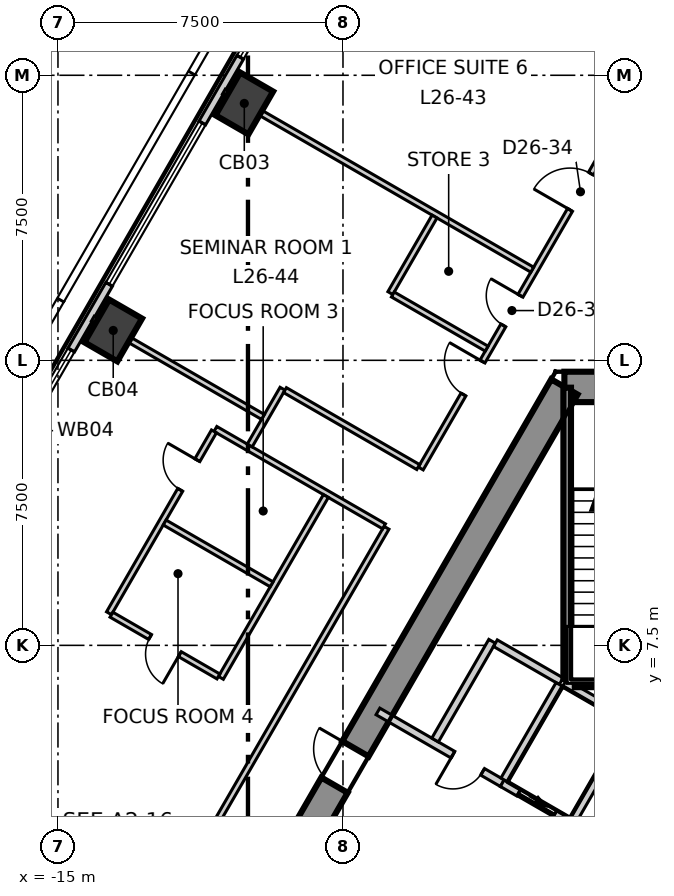
"""IFC4 building model, lengths in metres.
Left out: names, types, materials, properties, quantities, classifications, styles, units other than length and angle.
Written with IfcOpenShell. Run it as: python <this file> out.ifc"""

import sys

from ifc_helpers import new_model, si_unit, direction, frame, frame_2d, origin, origin_2d, place, context, subcontext, project, spatial, polyline, rectangle, outline, extrude, element, fill, save


model = new_model("IFC4")
c1 = context("Model", 3, precision=1e-05, world=origin(), true_north=direction((0.0, 1.0)))
c2 = subcontext(c1, "Body", "Model", "MODEL_VIEW")
j1 = project(units=[si_unit("LENGTHUNIT", "METRE"), si_unit("PLANEANGLEUNIT", "RADIAN")], contexts=[c1])
p1 = place(None, origin())
s1 = spatial("IfcSite", under=j1, at=p1, CompositionType="ELEMENT")
p2 = place(p1, origin())
s2 = spatial("IfcBuilding", under=s1, at=p2, CompositionType="ELEMENT")
p3 = place(p2, frame((0.0, 0.0, 116.3)))
s3 = spatial("IfcBuildingStorey", under=s2, at=p3, CompositionType="ELEMENT", Elevation=116.3)
p4 = place(p3, frame((1.674, 14.3, -0.3), z_axis=(0.0, 0.0, 1.0), x_axis=(-1.0, 0.0, 0.0)))
e1 = element("IfcWall", 1, at=p4, inside=s3, PredefinedType="SHEAR", context=c2, shape_type="SweptSolid", body=[
    extrude(outline(polyline([(-0.231, -0.4), (1.674, -0.4), (3.579, -0.4), (3.117, 0.4), (1.674, 0.4), (0.231, 0.4), (-0.231, -0.4)])), origin(), (0.0, 0.0, 1.0), 4.0),
])
p5 = place(p4, frame((0.974, 0.0, 0.3)))
e2 = element("IfcOpeningElement", 2, at=p5, cuts=e1, PredefinedType="OPENING", context=c2, shape_type="SweptSolid", body=[
    extrude(rectangle(XDim=1.4, YDim=2.1, at=frame_2d((0.7, 1.05))), frame((0.0, 0.41, 0.0), z_axis=(0.0, -1.0, 0.0), x_axis=(1.0, 0.0, 0.0)), (0.0, 0.0, 1.0), 0.82),
])
p6 = place(p3, frame((-1.674, 14.3, -0.3), z_axis=(0.0, 0.0, 1.0), x_axis=(-0.499995765644, -0.866027848477, 0.0)))
e3 = element("IfcWall", 3, at=p6, inside=s3, PredefinedType="SHEAR", context=c2, shape_type="SweptSolid", body=[
    extrude(outline(polyline([(-0.231, -0.4), (1.732, -0.4), (3.695, -0.4), (5.658, -0.4), (7.621, -0.4), (9.584, -0.4), (11.547, -0.4), (13.51, -0.4), (15.473, -0.4), (17.436, -0.4), (19.399, -0.4), (21.362, -0.4), (23.325, -0.4), (22.863, 0.4), (20.977, 0.4), (19.091, 0.4), (17.205, 0.4), (15.319, 0.4), (13.433, 0.4), (11.547, 0.4), (9.661, 0.4), (7.775, 0.4), (5.889, 0.4), (4.003, 0.4), (2.117, 0.4), (0.231, 0.4), (-0.231, -0.4)])), origin(), (0.0, 0.0, 1.0), 4.0),
])
p7 = place(p6, frame((10.997, 0.0, 0.3)))
e4 = element("IfcOpeningElement", 4, at=p7, cuts=e3, PredefinedType="OPENING", context=c2, shape_type="SweptSolid", body=[
    extrude(rectangle(XDim=1.1, YDim=2.1, at=frame_2d((0.55, 1.05))), frame((0.0, 0.41, 0.0), z_axis=(0.0, -1.0, 0.0), x_axis=(1.0, 0.0, 0.0)), (0.0, 0.0, 1.0), 0.82),
])
for number, where, z_axis, x_axis in (
    (5, (-10.097, 21.76, -0.3), (0.0, 0.0, 1.0), (0.5, 0.866, 0.0)),
    (6, (-13.546, 15.786, -0.3), (0.0, 0.0, 1.0), (0.5, 0.866, 0.0)),
):
    element("IfcColumn", number, at=place(p3, frame(where, z_axis=z_axis, x_axis=x_axis)), inside=s3, PredefinedType="COLUMN", context=c2, shape_type="SweptSolid", body=[
        extrude(rectangle(XDim=1.3, YDim=1.0, at=origin_2d()), origin(), (0.0, 0.0, 1.0), 4.0),
    ])
p8 = place(p3, frame((-3.154, 35.185, 0.0), z_axis=(0.0, 0.0, 1.0), x_axis=(-0.499996704161, -0.866027306629, 0.0)))
e7 = element("IfcWall", 7, at=p8, inside=s3, PredefinedType="ELEMENTEDWALL", context=c2, shape_type="SweptSolid", body=[
    extrude(rectangle(XDim=57.769, YDim=0.2, at=frame_2d((28.884, 0.0))), origin(), (0.0, 0.0, 1.0), 3.7),
])
p9 = place(p8, frame((2.301, 0.0, 0.9)))
e8 = element("IfcOpeningElement", 8, at=p9, cuts=e7, PredefinedType="OPENING", context=c2, shape_type="SweptSolid", body=[
    extrude(rectangle(XDim=4.9, YDim=2.5, at=frame_2d((2.45, 1.25))), frame((0.0, 0.11, 0.0), z_axis=(0.0, -1.0, 0.0), x_axis=(1.0, 0.0, 0.0)), (0.0, 0.0, 1.0), 0.22),
])
p10 = place(p8, frame((9.199, 0.0, 0.9)))
e9 = element("IfcOpeningElement", 9, at=p10, cuts=e7, PredefinedType="OPENING", context=c2, shape_type="SweptSolid", body=[
    extrude(rectangle(XDim=4.9, YDim=2.5, at=frame_2d((2.45, 1.25))), frame((0.0, 0.11, 0.0), z_axis=(0.0, -1.0, 0.0), x_axis=(1.0, 0.0, 0.0)), (0.0, 0.0, 1.0), 0.22),
])
p11 = place(p8, frame((16.097, 0.0, 0.9)))
e10 = element("IfcOpeningElement", 10, at=p11, cuts=e7, PredefinedType="OPENING", context=c2, shape_type="SweptSolid", body=[
    extrude(rectangle(XDim=4.9, YDim=2.5, at=frame_2d((2.45, 1.25))), frame((0.0, 0.11, 0.0), z_axis=(0.0, -1.0, 0.0), x_axis=(1.0, 0.0, 0.0)), (0.0, 0.0, 1.0), 0.22),
])
p12 = place(p8, frame((22.995, 0.0, 0.9)))
e11 = element("IfcOpeningElement", 11, at=p12, cuts=e7, PredefinedType="OPENING", context=c2, shape_type="SweptSolid", body=[
    extrude(rectangle(XDim=4.9, YDim=2.5, at=frame_2d((2.45, 1.25))), frame((0.0, 0.11, 0.0), z_axis=(0.0, -1.0, 0.0), x_axis=(1.0, 0.0, 0.0)), (0.0, 0.0, 1.0), 0.22),
])
p13 = place(p8, frame((29.893, 0.0, 0.9)))
e12 = element("IfcOpeningElement", 12, at=p13, cuts=e7, PredefinedType="OPENING", context=c2, shape_type="SweptSolid", body=[
    extrude(rectangle(XDim=4.9, YDim=2.5, at=frame_2d((2.45, 1.25))), frame((0.0, 0.11, 0.0), z_axis=(0.0, -1.0, 0.0), x_axis=(1.0, 0.0, 0.0)), (0.0, 0.0, 1.0), 0.22),
])
p14 = place(p8, frame((36.791, 0.0, 0.9)))
e13 = element("IfcOpeningElement", 13, at=p14, cuts=e7, PredefinedType="OPENING", context=c2, shape_type="SweptSolid", body=[
    extrude(rectangle(XDim=4.9, YDim=2.5, at=frame_2d((2.45, 1.25))), frame((0.0, 0.11, 0.0), z_axis=(0.0, -1.0, 0.0), x_axis=(1.0, 0.0, 0.0)), (0.0, 0.0, 1.0), 0.22),
])
p15 = place(p8, frame((43.689, 0.0, 0.9)))
e14 = element("IfcOpeningElement", 14, at=p15, cuts=e7, PredefinedType="OPENING", context=c2, shape_type="SweptSolid", body=[
    extrude(rectangle(XDim=4.9, YDim=2.5, at=frame_2d((2.45, 1.25))), frame((0.0, 0.11, 0.0), z_axis=(0.0, -1.0, 0.0), x_axis=(1.0, 0.0, 0.0)), (0.0, 0.0, 1.0), 0.22),
])
p16 = place(p8, frame((50.586, 0.0, 0.9)))
e15 = element("IfcOpeningElement", 15, at=p16, cuts=e7, PredefinedType="OPENING", context=c2, shape_type="SweptSolid", body=[
    extrude(rectangle(XDim=4.9, YDim=2.5, at=frame_2d((2.45, 1.25))), frame((0.0, 0.11, 0.0), z_axis=(0.0, -1.0, 0.0), x_axis=(1.0, 0.0, 0.0)), (0.0, 0.0, 1.0), 0.22),
])
p17 = place(p3, frame((-18.631, -10.67, 0.0), z_axis=(0.0, 0.0, 1.0), x_axis=(0.499981532133, 0.86603606595, 0.0)))
e16 = element("IfcWall", 16, at=p17, inside=s3, PredefinedType="PARTITIONING", context=c2, shape_type="SweptSolid", body=[
    extrude(rectangle(XDim=24.553, YDim=0.15, at=frame_2d((12.277, 0.0))), origin(), (0.0, 0.0, 1.0), 3.7),
])
p18 = place(p17, frame((11.604, 0.0, 0.0)))
e17 = element("IfcOpeningElement", 17, at=p18, cuts=e16, PredefinedType="OPENING", context=c2, shape_type="SweptSolid", body=[
    extrude(rectangle(XDim=1.1, YDim=2.1, at=frame_2d((0.55, 1.05))), frame((0.0, 0.085, 0.0), z_axis=(0.0, -1.0, 0.0), x_axis=(1.0, 0.0, 0.0)), (0.0, 0.0, 1.0), 0.17),
])
p19 = place(p3, frame((-5.454, 12.154, 0.0), z_axis=(0.0, 0.0, 1.0), x_axis=(0.500029221456, 0.866008532111, 0.0)))
e18 = element("IfcWall", 18, at=p19, inside=s3, PredefinedType="PARTITIONING", context=c2, shape_type="SweptSolid", body=[
    extrude(rectangle(XDim=10.907, YDim=0.15, at=frame_2d((5.454, 0.0))), origin(), (0.0, 0.0, 1.0), 3.7),
])
p20 = place(p19, frame((7.857, 0.0, 0.0)))
e19 = element("IfcOpeningElement", 19, at=p20, cuts=e18, PredefinedType="OPENING", context=c2, shape_type="SweptSolid", body=[
    extrude(rectangle(XDim=1.1, YDim=2.1, at=frame_2d((0.55, 1.05))), frame((0.0, 0.085, 0.0), z_axis=(0.0, -1.0, 0.0), x_axis=(1.0, 0.0, 0.0)), (0.0, 0.0, 1.0), 0.17),
])
p21 = place(p19, frame((2.248, 0.0, 0.0)))
e20 = element("IfcOpeningElement", 20, at=p21, cuts=e18, PredefinedType="OPENING", context=c2, shape_type="SweptSolid", body=[
    extrude(rectangle(XDim=1.0, YDim=2.1, at=frame_2d((0.5, 1.05))), frame((0.0, 0.085, 0.0), z_axis=(0.0, -1.0, 0.0), x_axis=(1.0, 0.0, 0.0)), (0.0, 0.0, 1.0), 0.17),
])
p22 = place(p19, frame((4.348, 0.0, 0.0)))
e21 = element("IfcOpeningElement", 21, at=p22, cuts=e18, PredefinedType="OPENING", context=c2, shape_type="SweptSolid", body=[
    extrude(rectangle(XDim=0.9, YDim=2.1, at=frame_2d((0.45, 1.05))), frame((0.0, 0.085, 0.0), z_axis=(0.0, -1.0, 0.0), x_axis=(1.0, 0.0, 0.0)), (0.0, 0.0, 1.0), 0.17),
])
p23 = place(p3, frame((-10.857, 13.194, 0.0), z_axis=(0.0, 0.0, 1.0), x_axis=(0.865999895656, -0.500044178772, 0.0)))
e22 = element("IfcWall", 22, at=p23, inside=s3, PredefinedType="PARTITIONING", context=c2, shape_type="SweptSolid", body=[
    extrude(rectangle(XDim=5.124, YDim=0.15, at=frame_2d((2.562, 0.0))), origin(), (0.0, 0.0, 1.0), 3.7),
])
p24 = place(p3, frame((-9.954, 12.759, 0.0), z_axis=(0.0, 0.0, 1.0), x_axis=(0.500232802748, 0.865890953328, 0.0)))
e23 = element("IfcWall", 23, at=p24, inside=s3, PredefinedType="PARTITIONING", context=c2, shape_type="SweptSolid", body=[
    extrude(rectangle(XDim=1.725, YDim=0.15, at=frame_2d((0.863, 0.0))), origin(), (0.0, 0.0, 1.0), 3.7),
])
p25 = place(p3, frame((-14.083, 16.096, 0.0), z_axis=(0.0, 0.0, 1.0), x_axis=(0.866014140959, -0.500019507279, 0.0)))
e24 = element("IfcWall", 24, at=p25, inside=s3, PredefinedType="PARTITIONING", context=c2, shape_type="SweptSolid", body=[
    extrude(rectangle(XDim=5.17, YDim=0.15, at=frame_2d((2.585, 0.0))), origin(), (0.0, 0.0, 1.0), 3.7),
])
p26 = place(p3, frame((-10.634, 22.07, 0.0), z_axis=(0.0, 0.0, 1.0), x_axis=(0.866005502057, -0.500034469219, 0.0)))
e25 = element("IfcWall", 25, at=p26, inside=s3, PredefinedType="PARTITIONING", context=c2, shape_type="SweptSolid", body=[
    extrude(rectangle(XDim=9.369, YDim=0.15, at=frame_2d((4.685, 0.0))), origin(), (0.0, 0.0, 1.0), 3.7),
])
p27 = place(p3, frame((-9.026, 14.216, 0.0), z_axis=(0.0, 0.0, 1.0), x_axis=(0.865914407792, -0.500192201437, 0.0)))
e26 = element("IfcWall", 26, at=p27, inside=s3, PredefinedType="PARTITIONING", context=c2, shape_type="SweptSolid", body=[
    extrude(rectangle(XDim=4.049, YDim=0.15, at=frame_2d((2.024, 0.0))), origin(), (0.0, 0.0, 1.0), 3.7),
])
p28 = place(p3, frame((-6.253, 16.769, 0.0), z_axis=(0.0, 0.0, 1.0), x_axis=(0.499719423372, 0.866187334186, 0.0)))
e27 = element("IfcWall", 27, at=p28, inside=s3, PredefinedType="PARTITIONING", context=c2, shape_type="SweptSolid", body=[
    extrude(rectangle(XDim=2.325, YDim=0.15, at=frame_2d((1.163, 0.0))), origin(), (0.0, 0.0, 1.0), 3.7),
])
p29 = place(p3, frame((-6.188, 16.732, 0.0), z_axis=(0.0, 0.0, 1.0), x_axis=(0.866004402611, -0.500036373335, 0.0)))
e28 = element("IfcWall", 28, at=p29, inside=s3, PredefinedType="PARTITIONING", context=c2, shape_type="SweptSolid", body=[
    extrude(rectangle(XDim=2.85, YDim=0.15, at=frame_2d((1.425, 0.0))), origin(), (0.0, 0.0, 1.0), 3.7),
])
p30 = place(p3, frame((-10.713, 6.645, 0.0), z_axis=(0.0, 0.0, 1.0), x_axis=(0.500050108258, 0.865996471835, 0.0)))
e29 = element("IfcWall", 29, at=p30, inside=s3, PredefinedType="PARTITIONING", context=c2, shape_type="SweptSolid", body=[
    extrude(rectangle(XDim=5.525, YDim=0.15, at=frame_2d((2.763, 0.0))), origin(), (0.0, 0.0, 1.0), 3.7),
])
p31 = place(p3, frame((-13.657, 8.345, 0.0), z_axis=(0.0, 0.0, 1.0), x_axis=(0.499917542299, 0.866073005526, 0.0)))
e30 = element("IfcWall", 30, at=p31, inside=s3, PredefinedType="PARTITIONING", context=c2, shape_type="SweptSolid", body=[
    extrude(rectangle(XDim=5.525, YDim=0.15, at=frame_2d((2.762, 0.0))), origin(), (0.0, 0.0, 1.0), 3.7),
])
p32 = place(p31, frame((3.75, 0.0, 0.0)))
e31 = element("IfcOpeningElement", 31, at=p32, cuts=e30, PredefinedType="OPENING", context=c2, shape_type="SweptSolid", body=[
    extrude(rectangle(XDim=0.9, YDim=2.1, at=frame_2d((0.45, 1.05))), frame((0.0, 0.085, 0.0), z_axis=(0.0, -1.0, 0.0), x_axis=(1.0, 0.0, 0.0)), (0.0, 0.0, 1.0), 0.17),
])
p33 = place(p3, frame((-13.592, 8.307, 0.0), z_axis=(0.0, 0.0, 1.0), x_axis=(0.865977875238, -0.500082312822, 0.0)))
e32 = element("IfcWall", 32, at=p33, inside=s3, PredefinedType="PARTITIONING", context=c2, shape_type="SweptSolid", body=[
    extrude(rectangle(XDim=3.25, YDim=0.15, at=frame_2d((1.625, 0.0))), origin(), (0.0, 0.0, 1.0), 3.2),
])
p34 = place(p33, frame((1.175, 0.0, 0.0)))
e33 = element("IfcOpeningElement", 33, at=p34, cuts=e32, PredefinedType="OPENING", context=c2, shape_type="SweptSolid", body=[
    extrude(rectangle(XDim=0.9, YDim=2.1, at=frame_2d((0.45, 1.05))), frame((0.0, 0.085, 0.0), z_axis=(0.0, -1.0, 0.0), x_axis=(1.0, 0.0, 0.0)), (0.0, 0.0, 1.0), 0.17),
])
p35 = place(p3, frame((-12.192, 10.732, 0.0), z_axis=(0.0, 0.0, 1.0), x_axis=(0.865977875238, -0.500082312822, 0.0)))
e34 = element("IfcWall", 34, at=p35, inside=s3, PredefinedType="PARTITIONING", context=c2, shape_type="SweptSolid", body=[
    extrude(rectangle(XDim=3.25, YDim=0.15, at=frame_2d((1.625, 0.0))), origin(), (0.0, 0.0, 1.0), 3.7),
])
p36 = place(p3, frame((-6.58, 5.762, 0.0), z_axis=(0.0, 0.0, 1.0), x_axis=(0.866029704776, -0.49999255039, 0.0)))
e35 = element("IfcWall", 35, at=p36, inside=s3, PredefinedType="SOLIDWALL", context=c2, shape_type="SweptSolid", body=[
    extrude(rectangle(XDim=3.782, YDim=0.2, at=frame_2d((1.891, 0.0))), origin(), (0.0, 0.0, 1.0), 3.7),
])
p37 = place(p36, frame((2.279, 0.0, 0.0)))
e36 = element("IfcOpeningElement", 36, at=p37, cuts=e35, PredefinedType="OPENING", context=c2, shape_type="SweptSolid", body=[
    extrude(rectangle(XDim=0.9, YDim=2.1, at=frame_2d((0.45, 1.05))), frame((0.0, 0.11, 0.0), z_axis=(0.0, -1.0, 0.0), x_axis=(1.0, 0.0, 0.0)), (0.0, 0.0, 1.0), 0.22),
])
p38 = place(p3, frame((-5.076, 5.009, 0.0), z_axis=(0.0, 0.0, 1.0), x_axis=(0.50002537861, 0.866010750942, 0.0)))
e37 = element("IfcWall", 37, at=p38, inside=s3, PredefinedType="SOLIDWALL", context=c2, shape_type="SweptSolid", body=[
    extrude(rectangle(XDim=3.0, YDim=0.2, at=frame_2d((1.5, 0.0))), origin(), (0.0, 0.0, 1.0), 3.7),
])
p39 = place(p3, frame((-3.489, 7.557, 0.0), z_axis=(0.0, 0.0, 1.0), x_axis=(0.866010750942, -0.50002537861, 0.0)))
e38 = element("IfcWall", 38, at=p39, inside=s3, PredefinedType="SOLIDWALL", context=c2, shape_type="SweptSolid", body=[
    extrude(rectangle(XDim=2.0, YDim=0.2, at=frame_2d((1.0, 0.0))), origin(), (0.0, 0.0, 1.0), 3.7),
])
p40 = place(p3, frame((-3.309, 3.873, 0.0), z_axis=(0.0, 0.0, 1.0), x_axis=(0.866098583652, -0.499873227325, 0.0)))
e39 = element("IfcWall", 39, at=p40, inside=s3, PredefinedType="SOLIDWALL", context=c2, shape_type="SweptSolid", body=[
    extrude(rectangle(XDim=2.103, YDim=0.2, at=frame_2d((1.051, 0.0))), origin(), (0.0, 0.0, 1.0), 3.7),
])
p41 = place(p40, frame((0.502, 0.0, 0.0)))
e40 = element("IfcOpeningElement", 40, at=p41, cuts=e39, PredefinedType="OPENING", context=c2, shape_type="SweptSolid", body=[
    extrude(rectangle(XDim=1.1, YDim=2.1, at=frame_2d((0.55, 1.05))), frame((0.0, 0.11, 0.0), z_axis=(0.0, -1.0, 0.0), x_axis=(1.0, 0.0, 0.0)), (0.0, 0.0, 1.0), 0.22),
])
p42 = place(p3, frame((-3.257, 3.959, 0.0), z_axis=(0.0, 0.0, 1.0), x_axis=(0.50012328804, 0.865954211699, 0.0)))
e41 = element("IfcWall", 41, at=p42, inside=s3, PredefinedType="SOLIDWALL", context=c2, shape_type="SweptSolid", body=[
    extrude(rectangle(XDim=2.9, YDim=0.2, at=frame_2d((1.45, 0.0))), origin(), (0.0, 0.0, 1.0), 3.7),
])
p43 = place(p3, frame((-1.67, 6.507, 0.0), z_axis=(0.0, 0.0, 1.0), x_axis=(0.865941441609, -0.500145398563, 0.0)))
e42 = element("IfcWall", 42, at=p43, inside=s3, PredefinedType="SOLIDWALL", context=c2, shape_type="SweptSolid", body=[
    extrude(rectangle(XDim=1.815, YDim=0.2, at=frame_2d((0.908, 0.0))), origin(), (0.0, 0.0, 1.0), 3.7),
])
p44 = place(p3, frame((-1.438, 2.909, 0.0), z_axis=(0.0, 0.0, 1.0), x_axis=(0.499829630636, 0.866123744241, 0.0)))
e43 = element("IfcWall", 43, at=p44, inside=s3, PredefinedType="SOLIDWALL", context=c2, shape_type="SweptSolid", body=[
    extrude(rectangle(XDim=2.761, YDim=0.2, at=frame_2d((1.38, 0.0))), origin(), (0.0, 0.0, 1.0), 3.7),
])
p45 = place(p3, frame((-1.4, 6.5, 0.0), z_axis=(0.0, 0.0, 1.0), x_axis=(1.0, 0.0, 0.0)))
e44 = element("IfcWall", 44, at=p45, inside=s3, PredefinedType="SOLIDWALL", context=c2, shape_type="SweptSolid", body=[
    extrude(rectangle(XDim=2.8, YDim=0.2, at=frame_2d((1.4, 0.0))), origin(), (0.0, 0.0, 1.0), 3.7),
])
p46 = place(p3, frame((-1.6, 6.615, 0.0), z_axis=(0.0, 0.0, 1.0), x_axis=(0.0, 1.0, 0.0)))
e45 = element("IfcWall", 45, at=p46, inside=s3, PredefinedType="SOLIDWALL", context=c2, shape_type="SweptSolid", body=[
    extrude(rectangle(XDim=7.665, YDim=0.2, at=frame_2d((3.833, 0.0))), origin(), (0.0, 0.0, 1.0), 3.7),
])
p47 = place(p10, origin())
e46 = element("IfcWindow", 46, at=p47, inside=s3, PartitioningType="SINGLE_PANEL", PredefinedType="WINDOW", context=c2, shape_type="SweptSolid", body=[
    extrude(rectangle(XDim=4.9, YDim=2.5, at=frame_2d((2.45, 1.25))), frame((0.0, 0.03, 0.0), z_axis=(0.0, -1.0, 0.0), x_axis=(1.0, 0.0, 0.0)), (0.0, 0.0, 1.0), 0.06),
])
fill(e9, e46)
p48 = place(p11, origin())
e47 = element("IfcWindow", 47, at=p48, inside=s3, PartitioningType="SINGLE_PANEL", PredefinedType="WINDOW", context=c2, shape_type="SweptSolid", body=[
    extrude(rectangle(XDim=4.9, YDim=2.5, at=frame_2d((2.45, 1.25))), frame((0.0, 0.03, 0.0), z_axis=(0.0, -1.0, 0.0), x_axis=(1.0, 0.0, 0.0)), (0.0, 0.0, 1.0), 0.06),
])
fill(e10, e47)
p49 = place(p12, origin())
e48 = element("IfcWindow", 48, at=p49, inside=s3, PartitioningType="SINGLE_PANEL", PredefinedType="WINDOW", context=c2, shape_type="SweptSolid", body=[
    extrude(rectangle(XDim=4.9, YDim=2.5, at=frame_2d((2.45, 1.25))), frame((0.0, 0.03, 0.0), z_axis=(0.0, -1.0, 0.0), x_axis=(1.0, 0.0, 0.0)), (0.0, 0.0, 1.0), 0.06),
])
fill(e11, e48)
p50 = place(p41, origin())
e49 = element("IfcDoor", 49, at=p50, inside=s3, OperationType="SLIDING_TO_LEFT", PredefinedType="DOOR", context=c2, shape_type="SweptSolid", body=[
    extrude(rectangle(XDim=1.1, YDim=2.1, at=frame_2d((0.55, 1.05))), frame((0.0, 0.025, 0.0), z_axis=(0.0, -1.0, 0.0), x_axis=(1.0, 0.0, 0.0)), (0.0, 0.0, 1.0), 0.05),
])
fill(e40, e49)
p51 = place(p37, origin())
e50 = element("IfcDoor", 50, at=p51, inside=s3, OperationType="SINGLE_SWING_LEFT", PredefinedType="DOOR", context=c2, shape_type="SweptSolid", body=[
    extrude(rectangle(XDim=0.9, YDim=2.1, at=frame_2d((0.45, 1.05))), frame((0.0, 0.025, 0.0), z_axis=(0.0, -1.0, 0.0), x_axis=(1.0, 0.0, 0.0)), (0.0, 0.0, 1.0), 0.05),
])
fill(e36, e50)
p52 = place(p20, origin())
e51 = element("IfcDoor", 51, at=p52, inside=s3, OperationType="SINGLE_SWING_RIGHT", PredefinedType="DOOR", context=c2, shape_type="SweptSolid", body=[
    extrude(rectangle(XDim=1.1, YDim=2.1, at=frame_2d((0.55, 1.05))), frame((0.0, 0.025, 0.0), z_axis=(0.0, -1.0, 0.0), x_axis=(1.0, 0.0, 0.0)), (0.0, 0.0, 1.0), 0.05),
])
fill(e19, e51)
p53 = place(p21, origin())
e52 = element("IfcDoor", 52, at=p53, inside=s3, OperationType="SINGLE_SWING_LEFT", PredefinedType="DOOR", context=c2, shape_type="SweptSolid", body=[
    extrude(rectangle(XDim=1.0, YDim=2.1, at=frame_2d((0.5, 1.05))), frame((0.0, 0.025, 0.0), z_axis=(0.0, -1.0, 0.0), x_axis=(1.0, 0.0, 0.0)), (0.0, 0.0, 1.0), 0.05),
])
fill(e20, e52)
p54 = place(p22, origin())
e53 = element("IfcDoor", 53, at=p54, inside=s3, OperationType="SINGLE_SWING_LEFT", PredefinedType="DOOR", context=c2, shape_type="SweptSolid", body=[
    extrude(rectangle(XDim=0.9, YDim=2.1, at=frame_2d((0.45, 1.05))), frame((0.0, 0.025, 0.0), z_axis=(0.0, -1.0, 0.0), x_axis=(1.0, 0.0, 0.0)), (0.0, 0.0, 1.0), 0.05),
])
fill(e21, e53)
p55 = place(p32, origin())
e54 = element("IfcDoor", 54, at=p55, inside=s3, OperationType="SINGLE_SWING_LEFT", PredefinedType="DOOR", context=c2, shape_type="SweptSolid", body=[
    extrude(rectangle(XDim=0.9, YDim=2.1, at=frame_2d((0.45, 1.05))), frame((0.0, 0.025, 0.0), z_axis=(0.0, -1.0, 0.0), x_axis=(1.0, 0.0, 0.0)), (0.0, 0.0, 1.0), 0.05),
])
fill(e31, e54)
p56 = place(p34, origin())
e55 = element("IfcDoor", 55, at=p56, inside=s3, OperationType="SINGLE_SWING_RIGHT", PredefinedType="DOOR", context=c2, shape_type="SweptSolid", body=[
    extrude(rectangle(XDim=0.9, YDim=2.1, at=frame_2d((0.45, 1.05))), frame((0.0, 0.025, 0.0), z_axis=(0.0, -1.0, 0.0), x_axis=(1.0, 0.0, 0.0)), (0.0, 0.0, 1.0), 0.05),
])
fill(e33, e55)
p57 = place(p7, origin())
e56 = element("IfcDoor", 56, at=p57, inside=s3, OperationType="SINGLE_SWING_LEFT", PredefinedType="DOOR", context=c2, shape_type="SweptSolid", body=[
    extrude(rectangle(XDim=1.1, YDim=2.1, at=frame_2d((0.55, 1.05))), frame((0.0, 0.025, 0.0), z_axis=(0.0, -1.0, 0.0), x_axis=(1.0, 0.0, 0.0)), (0.0, 0.0, 1.0), 0.05),
])
fill(e4, e56)
save(model, sys.argv[1])
